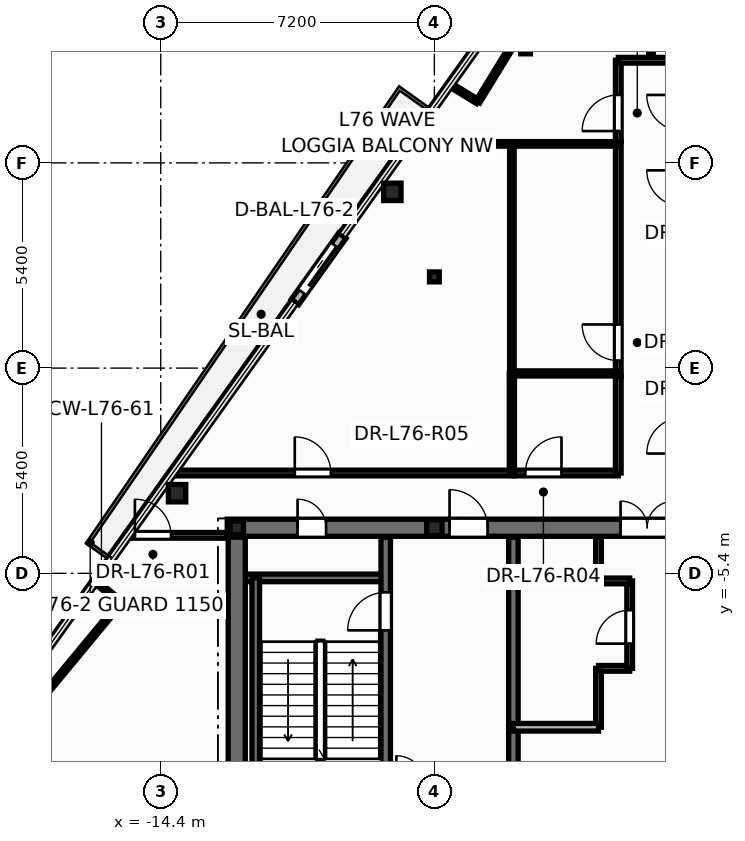
"""IFC4 building model, lengths in metres.
Left out: names, types, materials, properties, quantities, classifications, styles, units other than length and angle.
Written with IfcOpenShell. Run it as: python <this file> out.ifc"""

import sys

from ifc_helpers import new_model, si_unit, direction, frame, frame_2d, origin, origin_2d, place, context, subcontext, project, spatial, rectangle, hollow_circle, i_section, extrude, element, fill, save


model = new_model("IFC4")
c1 = context("Model", 3, precision=1e-05, world=origin(), true_north=direction((0.0, 1.0)))
c2 = subcontext(c1, "Body", "Model", "MODEL_VIEW")
j1 = project(units=[si_unit("LENGTHUNIT", "METRE"), si_unit("PLANEANGLEUNIT", "RADIAN")], contexts=[c1])
p1 = place(None, origin())
s1 = spatial("IfcSite", under=j1, at=p1, CompositionType="ELEMENT")
p2 = place(p1, origin())
s2 = spatial("IfcBuilding", under=s1, at=p2, CompositionType="ELEMENT")
p3 = place(p2, frame((0.0, 0.0, 289.2)))
s3 = spatial("IfcBuildingStorey", under=s2, at=p3, CompositionType="ELEMENT", Elevation=289.2)
for number, where, z_axis, x_axis in (
    (1, (-8.306, 4.638, 0.0), (0.0, 0.0, 1.0), (1.0, 0.0, 0.0)),
    (2, (-13.97, -3.292, 0.0), (0.0, 0.0, 1.0), (1.0, 0.0, 0.0)),
):
    element("IfcColumn", number, at=place(p3, frame(where, z_axis=z_axis, x_axis=x_axis)), inside=s3, PredefinedType="COLUMN", context=c2, shape_type="SweptSolid", body=[
        extrude(hollow_circle(Radius=0.229, WallThickness=0.016, at=origin_2d()), origin(), (0.0, 0.0, 1.0), 4.2),
    ])
p4 = place(p3, frame((-12.4, -4.2, 0.0), z_axis=(0.0, 0.0, 1.0), x_axis=(1.0, 0.0, 0.0)))
e3 = element("IfcColumn", 3, at=p4, inside=s3, PredefinedType="COLUMN", context=c2, shape_type="SweptSolid", body=[
    extrude(i_section(OverallWidth=0.352, OverallDepth=0.359, WebThickness=0.018, FlangeThickness=0.026, at=origin_2d()), origin(), (0.0, 0.0, 1.0), 4.2),
])
p5 = place(p3, frame((-7.2, -4.2, 0.0), z_axis=(0.0, 0.0, 1.0), x_axis=(1.0, 0.0, 0.0)))
e4 = element("IfcColumn", 4, at=p5, inside=s3, PredefinedType="PILASTER", context=c2, shape_type="SweptSolid", body=[
    extrude(i_section(OverallWidth=0.405, OverallDepth=0.414, WebThickness=0.022, FlangeThickness=0.032, at=origin_2d()), origin(), (0.0, 0.0, 1.0), 4.2),
])
for number, where, z_axis, x_axis in (
    (5, (-7.2, 2.4, 0.0), (0.0, 0.0, 1.0), (1.0, 0.0, 0.0)),
    (6, (-4.8, 8.4, 0.0), (0.0, 0.0, 1.0), (1.0, 0.0, 0.0)),
):
    element("IfcColumn", number, at=place(p3, frame(where, z_axis=z_axis, x_axis=x_axis)), inside=s3, PredefinedType="COLUMN", context=c2, shape_type="SweptSolid", body=[
        extrude(i_section(OverallWidth=0.256, OverallDepth=0.26, WebThickness=0.01, FlangeThickness=0.017, at=origin_2d()), origin(), (0.0, 0.0, 1.0), 4.2),
    ])
p6 = place(p3, frame((-9.623, 3.482, -0.015), z_axis=(0.0, 0.0, 1.0), x_axis=(-0.581238193719, -0.813733471207, 0.0)))
e7 = element("IfcWall", 7, at=p6, inside=s3, PredefinedType="STANDARD", context=c2, shape_type="SweptSolid", body=[
    extrude(rectangle(XDim=2.14, YDim=0.24, at=frame_2d((1.07, 0.0))), origin(), (0.0, 0.0, 1.0), 3.453),
])
p7 = place(p6, frame((0.32, 0.0, 0.015)))
e8 = element("IfcOpeningElement", 8, at=p7, cuts=e7, PredefinedType="OPENING", context=c2, shape_type="SweptSolid", body=[
    extrude(rectangle(XDim=1.506, YDim=2.204, at=frame_2d((0.75, 1.102))), frame((0.0, 0.13, 0.0), z_axis=(0.0, -1.0, 0.0), x_axis=(1.0, 0.0, 0.0)), (0.0, 0.0, 1.0), 0.26),
])
p8 = place(p3, frame((-2.88, -9.45, 0.0), z_axis=(0.0, 0.0, 1.0), x_axis=(0.0, 1.0, 0.0)))
e9 = element("IfcWall", 9, at=p8, inside=s3, PredefinedType="PARTITIONING", context=c2, shape_type="SweptSolid", body=[
    extrude(rectangle(XDim=1.55, YDim=0.15, at=frame_2d((0.775, 0.0))), origin(), (0.0, 0.0, 1.0), 3.92),
])
p9 = place(p3, frame((-2.88, -7.9, 0.0), z_axis=(0.0, 0.0, 1.0), x_axis=(1.0, 0.0, 0.0)))
e10 = element("IfcWall", 10, at=p9, inside=s3, PredefinedType="PARTITIONING", context=c2, shape_type="SweptSolid", body=[
    extrude(rectangle(XDim=0.82, YDim=0.15, at=frame_2d((0.41, 0.0))), origin(), (0.0, 0.0, 1.0), 3.92),
])
p10 = place(p3, frame((-2.06, -7.9, 0.0), z_axis=(0.0, 0.0, 1.0), x_axis=(0.0, 1.0, 0.0)))
e11 = element("IfcWall", 11, at=p10, inside=s3, PredefinedType="PARTITIONING", context=c2, shape_type="SweptSolid", body=[
    extrude(rectangle(XDim=2.3, YDim=0.15, at=frame_2d((1.15, 0.0))), origin(), (0.0, 0.0, 1.0), 3.92),
])
p11 = place(p10, frame((0.65, 0.0, 0.0)))
e12 = element("IfcOpeningElement", 12, at=p11, cuts=e11, PredefinedType="OPENING", context=c2, shape_type="SweptSolid", body=[
    extrude(rectangle(XDim=0.886, YDim=2.104, at=frame_2d((0.44, 1.052))), frame((0.0, 0.085, 0.0), z_axis=(0.0, -1.0, 0.0), x_axis=(1.0, 0.0, 0.0)), (0.0, 0.0, 1.0), 0.17),
])
p12 = place(p3, frame((-2.88, -5.6, 0.0), z_axis=(0.0, 0.0, 1.0), x_axis=(1.0, 0.0, 0.0)))
e13 = element("IfcWall", 13, at=p12, inside=s3, PredefinedType="PARTITIONING", context=c2, shape_type="SweptSolid", body=[
    extrude(rectangle(XDim=0.82, YDim=0.15, at=frame_2d((0.41, 0.0))), origin(), (0.0, 0.0, 1.0), 3.92),
])
p13 = place(p3, frame((-2.88, -5.6, 0.0), z_axis=(0.0, 0.0, 1.0), x_axis=(0.0, 1.0, 0.0)))
e14 = element("IfcWall", 14, at=p13, inside=s3, PredefinedType="PARTITIONING", context=c2, shape_type="SweptSolid", body=[
    extrude(rectangle(XDim=1.15, YDim=0.15, at=frame_2d((0.575, 0.0))), origin(), (0.0, 0.0, 1.0), 3.92),
])
p14 = place(p3, frame((-12.65, -4.2, 0.0), z_axis=(0.0, 0.0, 1.0), x_axis=(1.0, 0.0, 0.0)))
e15 = element("IfcWall", 15, at=p14, inside=s3, PredefinedType="SHEAR", context=c2, shape_type="SweptSolid", body=[
    extrude(rectangle(XDim=25.3, YDim=0.45, at=frame_2d((12.65, 0.0))), origin(), (0.0, 0.0, 1.0), 4.2),
])
p15 = place(p14, frame((1.85, 0.0, 0.0)))
e16 = element("IfcOpeningElement", 16, at=p15, cuts=e15, PredefinedType="OPENING", context=c2, shape_type="SweptSolid", body=[
    extrude(rectangle(XDim=0.756, YDim=2.054, at=frame_2d((0.375, 1.027))), frame((0.0, 0.235, 0.0), z_axis=(0.0, -1.0, 0.0), x_axis=(1.0, 0.0, 0.0)), (0.0, 0.0, 1.0), 0.47),
])
p16 = place(p14, frame((21.85, 0.0, 0.0)))
e17 = element("IfcOpeningElement", 17, at=p16, cuts=e15, PredefinedType="OPENING", context=c2, shape_type="SweptSolid", body=[
    extrude(rectangle(XDim=0.756, YDim=2.054, at=frame_2d((0.375, 1.027))), frame((0.0, 0.235, 0.0), z_axis=(0.0, -1.0, 0.0), x_axis=(1.0, 0.0, 0.0)), (0.0, 0.0, 1.0), 0.47),
])
p17 = place(p14, frame((23.5, 0.0, 0.0)))
e18 = element("IfcOpeningElement", 18, at=p17, cuts=e15, PredefinedType="OPENING", context=c2, shape_type="SweptSolid", body=[
    extrude(rectangle(XDim=0.756, YDim=2.054, at=frame_2d((0.375, 1.027))), frame((0.0, 0.235, 0.0), z_axis=(0.0, -1.0, 0.0), x_axis=(1.0, 0.0, 0.0)), (0.0, 0.0, 1.0), 0.47),
])
p18 = place(p14, frame((5.85, 0.0, 0.0)))
e19 = element("IfcOpeningElement", 19, at=p18, cuts=e15, PredefinedType="OPENING", context=c2, shape_type="SweptSolid", body=[
    extrude(rectangle(XDim=1.006, YDim=2.104, at=frame_2d((0.5, 1.052))), frame((0.0, 0.235, 0.0), z_axis=(0.0, -1.0, 0.0), x_axis=(1.0, 0.0, 0.0)), (0.0, 0.0, 1.0), 0.47),
])
p19 = place(p14, frame((10.35, 0.0, 0.0)))
e20 = element("IfcOpeningElement", 20, at=p19, cuts=e15, PredefinedType="OPENING", context=c2, shape_type="SweptSolid", body=[
    extrude(rectangle(XDim=1.406, YDim=2.154, at=frame_2d((0.7, 1.077))), frame((0.0, 0.235, 0.0), z_axis=(0.0, -1.0, 0.0), x_axis=(1.0, 0.0, 0.0)), (0.0, 0.0, 1.0), 0.47),
])
p20 = place(p14, frame((18.45, 0.0, 0.0)))
e21 = element("IfcOpeningElement", 21, at=p20, cuts=e15, PredefinedType="OPENING", context=c2, shape_type="SweptSolid", body=[
    extrude(rectangle(XDim=1.006, YDim=2.104, at=frame_2d((0.5, 1.052))), frame((0.0, 0.235, 0.0), z_axis=(0.0, -1.0, 0.0), x_axis=(1.0, 0.0, 0.0)), (0.0, 0.0, 1.0), 0.47),
])
p21 = place(p3, frame((-12.35, -5.52, 0.0), z_axis=(0.0, 0.0, 1.0), x_axis=(1.0, 0.0, 0.0)))
e22 = element("IfcWall", 22, at=p21, inside=s3, PredefinedType="SOLIDWALL", context=c2, shape_type="SweptSolid", body=[
    extrude(rectangle(XDim=3.87, YDim=0.2, at=frame_2d((1.935, 0.0))), origin(), (0.0, 0.0, 1.0), 4.2),
])
p22 = place(p3, frame((-11.9, -13.1, 0.0), z_axis=(0.0, 0.0, 1.0), x_axis=(0.0, 1.0, 0.0)))
e23 = element("IfcWall", 23, at=p22, inside=s3, PredefinedType="SOLIDWALL", context=c2, shape_type="SweptSolid", body=[
    extrude(rectangle(XDim=7.58, YDim=0.2, at=frame_2d((3.79, 0.0))), origin(), (0.0, 0.0, 1.0), 4.2),
])
p23 = place(p3, frame((-8.48, -13.85, 0.0), z_axis=(0.0, 0.0, 1.0), x_axis=(0.0, 1.0, 0.0)))
e24 = element("IfcWall", 24, at=p23, inside=s3, PredefinedType="SHEAR", context=c2, shape_type="SweptSolid", body=[
    extrude(rectangle(XDim=9.4, YDim=0.25, at=frame_2d((4.7, 0.0))), origin(), (0.0, 0.0, 1.0), 4.2),
])
p24 = place(p23, frame((6.95, 0.0, 0.0)))
e25 = element("IfcOpeningElement", 25, at=p24, cuts=e24, PredefinedType="OPENING", context=c2, shape_type="SweptSolid", body=[
    extrude(rectangle(XDim=1.006, YDim=2.104, at=frame_2d((0.5, 1.052))), frame((0.0, 0.135, 0.0), z_axis=(0.0, -1.0, 0.0), x_axis=(1.0, 0.0, 0.0)), (0.0, 0.0, 1.0), 0.27),
])
p25 = place(p3, frame((-5.12, -13.85, 0.0), z_axis=(0.0, 0.0, 1.0), x_axis=(0.0, 1.0, 0.0)))
e26 = element("IfcWall", 26, at=p25, inside=s3, PredefinedType="SHEAR", context=c2, shape_type="SweptSolid", body=[
    extrude(rectangle(XDim=9.4, YDim=0.25, at=frame_2d((4.7, 0.0))), origin(), (0.0, 0.0, 1.0), 4.2),
])
p26 = place(p3, frame((-12.4, -13.85, 0.0), z_axis=(0.0, 0.0, 1.0), x_axis=(0.0, 1.0, 0.0)))
e27 = element("IfcWall", 27, at=p26, inside=s3, PredefinedType="SHEAR", context=c2, shape_type="SweptSolid", body=[
    extrude(rectangle(XDim=9.4, YDim=0.45, at=frame_2d((4.7, 0.0))), origin(), (0.0, 0.0, 1.0), 4.2),
])
p27 = place(p3, frame((-5.12, -9.45, 0.0), z_axis=(0.0, 0.0, 1.0), x_axis=(1.0, 0.0, 0.0)))
e28 = element("IfcWall", 28, at=p27, inside=s3, PredefinedType="SOLIDWALL", context=c2, shape_type="SweptSolid", body=[
    extrude(rectangle(XDim=2.24, YDim=0.2, at=frame_2d((1.12, 0.0))), origin(), (0.0, 0.0, 1.0), 3.92),
])
p28 = place(p3, frame((-14.082, -2.76, 0.0), z_axis=(0.0, 0.0, 1.0), x_axis=(1.0, 0.0, 0.0)))
e29 = element("IfcWall", 29, at=p28, inside=s3, PredefinedType="PARTITIONING", context=c2, shape_type="SweptSolid", body=[
    extrude(rectangle(XDim=8.982, YDim=0.15, at=frame_2d((4.491, 0.0))), origin(), (0.0, 0.0, 1.0), 2.895),
])
p29 = place(p28, frame((3.209, 0.0, 0.0)))
e30 = element("IfcOpeningElement", 30, at=p29, cuts=e29, PredefinedType="OPENING", context=c2, shape_type="SweptSolid", body=[
    extrude(rectangle(XDim=0.956, YDim=2.104, at=frame_2d((0.475, 1.052))), frame((0.0, 0.085, 0.0), z_axis=(0.0, -1.0, 0.0), x_axis=(1.0, 0.0, 0.0)), (0.0, 0.0, 1.0), 0.17),
])
p30 = place(p3, frame((-1.5, 8.1, 0.0), z_axis=(0.0, 0.0, 1.0), x_axis=(0.0, 1.0, 0.0)))
e31 = element("IfcWall", 31, at=p30, inside=s3, PredefinedType="PARTITIONING", context=c2, shape_type="SweptSolid", body=[
    extrude(rectangle(XDim=6.189, YDim=0.12, at=frame_2d((3.095, 0.0))), origin(), (0.0, 0.0, 1.0), 2.895),
])
p31 = place(p3, frame((-2.36, -0.2, 0.0), z_axis=(0.0, 0.0, 1.0), x_axis=(0.0, 1.0, 0.0)))
e32 = element("IfcWall", 32, at=p31, inside=s3, PredefinedType="PARTITIONING", context=c2, shape_type="SweptSolid", body=[
    extrude(rectangle(XDim=6.16, YDim=0.15, at=frame_2d((3.08, 0.0))), origin(), (0.0, 0.0, 1.0), 2.895),
])
p32 = place(p31, frame((0.398, 0.0, 0.0)))
e33 = element("IfcOpeningElement", 33, at=p32, cuts=e32, PredefinedType="OPENING", context=c2, shape_type="SweptSolid", body=[
    extrude(rectangle(XDim=0.956, YDim=2.104, at=frame_2d((0.475, 1.052))), frame((0.0, 0.085, 0.0), z_axis=(0.0, -1.0, 0.0), x_axis=(1.0, 0.0, 0.0)), (0.0, 0.0, 1.0), 0.17),
])
p33 = place(p3, frame((-5.16, -0.2, 0.0), z_axis=(0.0, 0.0, 1.0), x_axis=(0.0, 1.0, 0.0)))
e34 = element("IfcWall", 34, at=p33, inside=s3, PredefinedType="PARTITIONING", context=c2, shape_type="SweptSolid", body=[
    extrude(rectangle(XDim=6.1, YDim=0.12, at=frame_2d((3.05, 0.0))), origin(), (0.0, 0.0, 1.0), 2.895),
])
p34 = place(p3, frame((-15.453, -6.164, 0.0), z_axis=(0.0, 0.0, 1.0), x_axis=(-0.63764463782, -0.770330653589, 0.0)))
e35 = element("IfcWall", 35, at=p34, inside=s3, PredefinedType="PARTITIONING", context=c2, shape_type="SweptSolid", body=[
    extrude(rectangle(XDim=3.248, YDim=0.12, at=frame_2d((1.624, 0.0))), origin(), (0.0, 0.0, 1.0), 3.92),
])
p35 = place(p3, frame((-4.416, 9.682, 0.0), z_axis=(0.0, 0.0, 1.0), x_axis=(-0.523167839784, -0.852229670579, 0.0)))
e36 = element("IfcWall", 36, at=p35, inside=s3, PredefinedType="PARTITIONING", context=c2, shape_type="SweptSolid", body=[
    extrude(rectangle(XDim=3.137, YDim=0.12, at=frame_2d((1.568, 0.0))), origin(), (0.0, 0.0, 1.0), 2.895),
])
p36 = place(p3, frame((-5.098, -2.76, 0.0), z_axis=(0.0, 0.0, 1.0), x_axis=(1.0, 0.0, 0.0)))
e37 = element("IfcWall", 37, at=p36, inside=s3, PredefinedType="PARTITIONING", context=c2, shape_type="SweptSolid", body=[
    extrude(rectangle(XDim=2.738, YDim=0.15, at=frame_2d((1.369, 0.0))), origin(), (0.0, 0.0, 1.0), 3.54),
])
p37 = place(p36, frame((0.293, 0.0, 0.0)))
e38 = element("IfcOpeningElement", 38, at=p37, cuts=e37, PredefinedType="OPENING", context=c2, shape_type="SweptSolid", body=[
    extrude(rectangle(XDim=0.956, YDim=2.104, at=frame_2d((0.475, 1.052))), frame((0.0, 0.085, 0.0), z_axis=(0.0, -1.0, 0.0), x_axis=(1.0, 0.0, 0.0)), (0.0, 0.0, 1.0), 0.17),
])
p38 = place(p3, frame((-15.254, -4.4, 0.0), z_axis=(0.0, 0.0, 1.0), x_axis=(1.0, 0.0, 0.0)))
e39 = element("IfcWall", 39, at=p38, inside=s3, PredefinedType="PARTITIONING", context=c2, shape_type="SweptSolid", body=[
    extrude(rectangle(XDim=2.602, YDim=0.15, at=frame_2d((1.301, 0.0))), origin(), (0.0, 0.0, 1.0), 2.895),
])
p39 = place(p38, frame((0.174, 0.0, 0.0)))
e40 = element("IfcOpeningElement", 40, at=p39, cuts=e39, PredefinedType="OPENING", context=c2, shape_type="SweptSolid", body=[
    extrude(rectangle(XDim=0.956, YDim=2.104, at=frame_2d((0.475, 1.052))), frame((0.0, 0.085, 0.0), z_axis=(0.0, -1.0, 0.0), x_axis=(1.0, 0.0, 0.0)), (0.0, 0.0, 1.0), 0.17),
])
p40 = place(p3, frame((-5.16, -0.14, 0.0), z_axis=(0.0, 0.0, 1.0), x_axis=(1.0, 0.0, 0.0)))
e41 = element("IfcWall", 41, at=p40, inside=s3, PredefinedType="PARTITIONING", context=c2, shape_type="SweptSolid", body=[
    extrude(rectangle(XDim=2.8, YDim=0.135, at=frame_2d((1.4, 0.0))), origin(), (0.0, 0.0, 1.0), 3.54),
])
p41 = place(p3, frame((-7.896, 5.9, 0.0), z_axis=(0.0, 0.0, 1.0), x_axis=(1.0, 0.0, 0.0)))
e42 = element("IfcWall", 42, at=p41, inside=s3, PredefinedType="PARTITIONING", context=c2, shape_type="SweptSolid", body=[
    extrude(rectangle(XDim=5.536, YDim=0.12, at=frame_2d((2.768, 0.0))), origin(), (0.0, 0.0, 1.0), 2.895),
])
p42 = place(p3, frame((-2.36, -2.76, 0.0), z_axis=(0.0, 0.0, 1.0), x_axis=(0.0, 1.0, 0.0)))
e43 = element("IfcWall", 43, at=p42, inside=s3, PredefinedType="PARTITIONING", context=c2, shape_type="SweptSolid", body=[
    extrude(rectangle(XDim=2.558, YDim=0.15, at=frame_2d((1.279, 0.0))), origin(), (0.0, 0.0, 1.0), 3.92),
])
p43 = place(p3, frame((-5.16, -2.76, 0.0), z_axis=(0.0, 0.0, 1.0), x_axis=(0.0, 1.0, 0.0)))
e44 = element("IfcWall", 44, at=p43, inside=s3, PredefinedType="PARTITIONING", context=c2, shape_type="SweptSolid", body=[
    extrude(rectangle(XDim=2.62, YDim=0.135, at=frame_2d((1.31, 0.0))), origin(), (0.0, 0.0, 1.0), 3.92),
])
p44 = place(p3, frame((-2.36, 5.962, 0.0), z_axis=(0.0, 0.0, 1.0), x_axis=(0.0, 1.0, 0.0)))
e45 = element("IfcWall", 45, at=p44, inside=s3, PredefinedType="PARTITIONING", context=c2, shape_type="SweptSolid", body=[
    extrude(rectangle(XDim=2.138, YDim=0.15, at=frame_2d((1.069, 0.0))), origin(), (0.0, 0.0, 1.0), 3.54),
])
p45 = place(p44, frame((0.275, 0.0, 0.0)))
e46 = element("IfcOpeningElement", 46, at=p45, cuts=e45, PredefinedType="OPENING", context=c2, shape_type="SweptSolid", body=[
    extrude(rectangle(XDim=0.956, YDim=2.104, at=frame_2d((0.475, 1.052))), frame((0.0, 0.085, 0.0), z_axis=(0.0, -1.0, 0.0), x_axis=(1.0, 0.0, 0.0)), (0.0, 0.0, 1.0), 0.17),
])
p46 = place(p3, frame((-2.36, 8.1, 0.0), z_axis=(0.0, 0.0, 1.0), x_axis=(1.0, 0.0, 0.0)))
e47 = element("IfcWall", 47, at=p46, inside=s3, PredefinedType="PARTITIONING", context=c2, shape_type="SweptSolid", body=[
    extrude(rectangle(XDim=1.7, YDim=0.15, at=frame_2d((0.85, 0.0))), origin(), (0.0, 0.0, 1.0), 2.895),
])
p47 = place(p3, frame((-16.112, -5.618, 0.0), z_axis=(0.0, 0.0, 1.0), x_axis=(0.770181697766, -0.637824546742, 0.0)))
e48 = element("IfcWall", 48, at=p47, inside=s3, PredefinedType="PARTITIONING", context=c2, shape_type="SweptSolid", body=[
    extrude(rectangle(XDim=0.856, YDim=0.12, at=frame_2d((0.428, 0.0))), origin(), (0.0, 0.0, 1.0), 3.438),
])
p48 = place(p3, frame((-6.057, 7.009, 0.0), z_axis=(0.0, 0.0, 1.0), x_axis=(-0.852193839214, 0.52322620386, 0.0)))
e49 = element("IfcWall", 49, at=p48, inside=s3, PredefinedType="PARTITIONING", context=c2, shape_type="SweptSolid", body=[
    extrude(rectangle(XDim=0.844, YDim=0.12, at=frame_2d((0.422, 0.0))), origin(), (0.0, 0.0, 1.0), 2.895),
])
p49 = place(p7, origin())
e50 = element("IfcDoor", 50, at=p49, inside=s3, OperationType="SLIDING_TO_RIGHT", PredefinedType="DOOR", context=c2, shape_type="SweptSolid", body=[
    extrude(rectangle(XDim=1.5, YDim=2.2, at=frame_2d((0.75, 1.1))), frame((0.0, 0.025, 0.0), z_axis=(0.0, -1.0, 0.0), x_axis=(1.0, 0.0, 0.0)), (0.0, 0.0, 1.0), 0.05),
])
fill(e8, e50)
p50 = place(p11, origin())
e51 = element("IfcDoor", 51, at=p50, inside=s3, OperationType="SINGLE_SWING_LEFT", PredefinedType="DOOR", context=c2, shape_type="SweptSolid", body=[
    extrude(rectangle(XDim=0.88, YDim=2.1, at=frame_2d((0.44, 1.05))), frame((0.0, 0.025, 0.0), z_axis=(0.0, -1.0, 0.0), x_axis=(1.0, 0.0, 0.0)), (0.0, 0.0, 1.0), 0.05),
])
fill(e12, e51)
p51 = place(p24, origin())
e52 = element("IfcDoor", 52, at=p51, inside=s3, OperationType="SINGLE_SWING_LEFT", PredefinedType="DOOR", context=c2, shape_type="SweptSolid", body=[
    extrude(rectangle(XDim=1.0, YDim=2.1, at=frame_2d((0.5, 1.05))), frame((0.0, 0.025, 0.0), z_axis=(0.0, -1.0, 0.0), x_axis=(1.0, 0.0, 0.0)), (0.0, 0.0, 1.0), 0.05),
])
fill(e25, e52)
p52 = place(p15, origin())
e53 = element("IfcDoor", 53, at=p52, inside=s3, OperationType="SINGLE_SWING_LEFT", PredefinedType="DOOR", context=c2, shape_type="SweptSolid", body=[
    extrude(rectangle(XDim=0.75, YDim=2.05, at=frame_2d((0.375, 1.025))), frame((0.0, 0.025, 0.0), z_axis=(0.0, -1.0, 0.0), x_axis=(1.0, 0.0, 0.0)), (0.0, 0.0, 1.0), 0.05),
])
fill(e16, e53)
p53 = place(p18, origin())
e54 = element("IfcDoor", 54, at=p53, inside=s3, OperationType="SINGLE_SWING_LEFT", PredefinedType="DOOR", context=c2, shape_type="SweptSolid", body=[
    extrude(rectangle(XDim=1.0, YDim=2.1, at=frame_2d((0.5, 1.05))), frame((0.0, 0.025, 0.0), z_axis=(0.0, -1.0, 0.0), x_axis=(1.0, 0.0, 0.0)), (0.0, 0.0, 1.0), 0.05),
])
fill(e19, e54)
p54 = place(p19, origin())
e55 = element("IfcDoor", 55, at=p54, inside=s3, OperationType="DOUBLE_DOOR_SINGLE_SWING", PredefinedType="DOOR", context=c2, shape_type="SweptSolid", body=[
    extrude(rectangle(XDim=1.4, YDim=2.15, at=frame_2d((0.7, 1.075))), frame((0.0, 0.025, 0.0), z_axis=(0.0, -1.0, 0.0), x_axis=(1.0, 0.0, 0.0)), (0.0, 0.0, 1.0), 0.05),
])
fill(e20, e55)
p55 = place(p39, origin())
e56 = element("IfcDoor", 56, at=p55, inside=s3, OperationType="SINGLE_SWING_LEFT", PredefinedType="DOOR", context=c2, shape_type="SweptSolid", body=[
    extrude(rectangle(XDim=0.95, YDim=2.1, at=frame_2d((0.475, 1.05))), frame((0.0, 0.025, 0.0), z_axis=(0.0, -1.0, 0.0), x_axis=(1.0, 0.0, 0.0)), (0.0, 0.0, 1.0), 0.05),
])
fill(e40, e56)
p56 = place(p37, origin())
e57 = element("IfcDoor", 57, at=p56, inside=s3, OperationType="SINGLE_SWING_RIGHT", PredefinedType="DOOR", context=c2, shape_type="SweptSolid", body=[
    extrude(rectangle(XDim=0.95, YDim=2.1, at=frame_2d((0.475, 1.05))), frame((0.0, 0.025, 0.0), z_axis=(0.0, -1.0, 0.0), x_axis=(1.0, 0.0, 0.0)), (0.0, 0.0, 1.0), 0.05),
])
fill(e38, e57)
p57 = place(p29, origin())
e58 = element("IfcDoor", 58, at=p57, inside=s3, OperationType="SINGLE_SWING_LEFT", PredefinedType="DOOR", context=c2, shape_type="SweptSolid", body=[
    extrude(rectangle(XDim=0.95, YDim=2.1, at=frame_2d((0.475, 1.05))), frame((0.0, 0.025, 0.0), z_axis=(0.0, -1.0, 0.0), x_axis=(1.0, 0.0, 0.0)), (0.0, 0.0, 1.0), 0.05),
])
fill(e30, e58)
p58 = place(p32, origin())
e59 = element("IfcDoor", 59, at=p58, inside=s3, OperationType="SINGLE_SWING_RIGHT", PredefinedType="DOOR", context=c2, shape_type="SweptSolid", body=[
    extrude(rectangle(XDim=0.95, YDim=2.1, at=frame_2d((0.475, 1.05))), frame((0.0, 0.025, 0.0), z_axis=(0.0, -1.0, 0.0), x_axis=(1.0, 0.0, 0.0)), (0.0, 0.0, 1.0), 0.05),
])
fill(e33, e59)
p59 = place(p45, origin())
e60 = element("IfcDoor", 60, at=p59, inside=s3, OperationType="SINGLE_SWING_LEFT", PredefinedType="DOOR", context=c2, shape_type="SweptSolid", body=[
    extrude(rectangle(XDim=0.95, YDim=2.1, at=frame_2d((0.475, 1.05))), frame((0.0, 0.025, 0.0), z_axis=(0.0, -1.0, 0.0), x_axis=(1.0, 0.0, 0.0)), (0.0, 0.0, 1.0), 0.05),
])
fill(e46, e60)
save(model, sys.argv[1])
